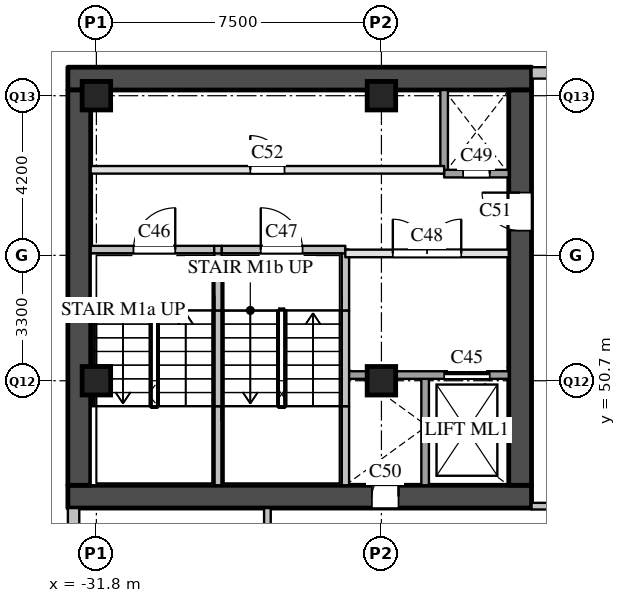
"""IFC4 building model, lengths in metres.
Left out: names, types, materials, properties, quantities, classifications, styles, units other than length and angle.
Written with IfcOpenShell. Run it as: python <this file> out.ifc"""

import sys

from ifc_helpers import new_model, si_unit, direction, frame, frame_2d, origin, origin_2d, place, context, subcontext, project, spatial, rectangle, extrude, element, fill, save


model = new_model("IFC4")
c1 = context("Model", 3, precision=1e-05, world=origin(), true_north=direction((0.0, 1.0)))
c2 = subcontext(c1, "Body", "Model", "MODEL_VIEW")
j1 = project(units=[si_unit("LENGTHUNIT", "METRE"), si_unit("PLANEANGLEUNIT", "RADIAN")], contexts=[c1])
p1 = place(None, origin())
s1 = spatial("IfcSite", under=j1, at=p1, CompositionType="ELEMENT")
p2 = place(p1, origin())
s2 = spatial("IfcBuilding", under=s1, at=p2, CompositionType="ELEMENT")
p3 = place(p2, frame((0.0, 0.0, 21.0)))
s3 = spatial("IfcBuildingStorey", under=s2, at=p3, CompositionType="ELEMENT", Elevation=21.0)
for number, where, z_axis, x_axis in (
    (1, (-31.8, 50.7, 0.0), (0.0, 0.0, 1.0), (1.0, 0.0, 0.0)),
    (2, (-31.8, 58.2, 0.0), (0.0, 0.0, 1.0), (1.0, 0.0, 0.0)),
    (3, (-24.3, 50.7, 0.0), (0.0, 0.0, 1.0), (1.0, 0.0, 0.0)),
    (4, (-24.3, 58.2, 0.0), (0.0, 0.0, 1.0), (1.0, 0.0, 0.0)),
):
    element("IfcColumn", number, at=place(p3, frame(where, z_axis=z_axis, x_axis=x_axis)), inside=s3, PredefinedType="COLUMN", context=c2, shape_type="SweptSolid", body=[
        extrude(rectangle(XDim=0.75, YDim=0.75, at=origin_2d()), origin(), (0.0, 0.0, 1.0), 5.0),
    ])
p4 = place(p3, frame((-16.8, 58.8, 0.0), z_axis=(0.0, 0.0, 1.0), x_axis=(-1.0, 0.0, 0.0)))
e5 = element("IfcWall", 5, at=p4, inside=s3, PredefinedType="SOLIDWALL", context=c2, shape_type="SweptSolid", body=[
    extrude(rectangle(XDim=3.55, YDim=0.3, at=frame_2d((1.775, 0.0))), origin(), (0.0, 0.0, 1.0), 4.59),
])
p5 = place(p3, frame((-32.4, 47.35, 0.0), z_axis=(0.0, 0.0, 1.0), x_axis=(0.0, -1.0, 0.0)))
e6 = element("IfcWall", 6, at=p5, inside=s3, PredefinedType="SOLIDWALL", context=c2, shape_type="SweptSolid", body=[
    extrude(rectangle(XDim=4.15, YDim=0.3, at=frame_2d((2.075, 0.0))), origin(), (0.0, 0.0, 1.0), 4.59),
])
p6 = place(p3, frame((-32.55, 47.65, 0.0), z_axis=(0.0, 0.0, 1.0), x_axis=(1.0, 0.0, 0.0)))
e7 = element("IfcWall", 7, at=p6, inside=s3, PredefinedType="SHEAR", context=c2, shape_type="SweptSolid", body=[
    extrude(rectangle(XDim=12.2, YDim=0.6, at=frame_2d((6.1, 0.0))), origin(), (0.0, 0.0, 1.0), 4.55),
])
p7 = place(p6, frame((8.0, 0.0, 0.0)))
e8 = element("IfcOpeningElement", 8, at=p7, cuts=e7, PredefinedType="OPENING", context=c2, shape_type="SweptSolid", body=[
    extrude(rectangle(XDim=0.7, YDim=2.1, at=frame_2d((0.35, 1.05))), frame((0.0, 0.31, 0.0), z_axis=(0.0, -1.0, 0.0), x_axis=(1.0, 0.0, 0.0)), (0.0, 0.0, 1.0), 0.62),
])
p8 = place(p3, frame((-32.55, 58.65, 0.0), z_axis=(0.0, 0.0, 1.0), x_axis=(1.0, 0.0, 0.0)))
e9 = element("IfcWall", 9, at=p8, inside=s3, PredefinedType="SHEAR", context=c2, shape_type="SweptSolid", body=[
    extrude(rectangle(XDim=12.2, YDim=0.6, at=frame_2d((6.1, 0.0))), origin(), (0.0, 0.0, 1.0), 4.55),
])
p9 = place(p3, frame((-32.25, 47.95, 0.0), z_axis=(0.0, 0.0, 1.0), x_axis=(0.0, 1.0, 0.0)))
e10 = element("IfcWall", 10, at=p9, inside=s3, PredefinedType="SHEAR", context=c2, shape_type="SweptSolid", body=[
    extrude(rectangle(XDim=10.4, YDim=0.6, at=frame_2d((5.2, 0.0))), origin(), (0.0, 0.0, 1.0), 4.55),
])
p10 = place(p3, frame((-20.65, 47.95, 0.0), z_axis=(0.0, 0.0, 1.0), x_axis=(0.0, 1.0, 0.0)))
e11 = element("IfcWall", 11, at=p10, inside=s3, PredefinedType="SHEAR", context=c2, shape_type="SweptSolid", body=[
    extrude(rectangle(XDim=10.4, YDim=0.6, at=frame_2d((5.2, 0.0))), origin(), (0.0, 0.0, 1.0), 4.55),
])
p11 = place(p10, frame((6.7, 0.0, 0.0)))
e12 = element("IfcOpeningElement", 12, at=p11, cuts=e11, PredefinedType="OPENING", context=c2, shape_type="SweptSolid", body=[
    extrude(rectangle(XDim=1.0, YDim=2.1, at=frame_2d((0.5, 1.05))), frame((0.0, 0.31, 0.0), z_axis=(0.0, -1.0, 0.0), x_axis=(1.0, 0.0, 0.0)), (0.0, 0.0, 1.0), 0.62),
])
p12 = place(p3, frame((-28.6, 47.95, 0.0), z_axis=(0.0, 0.0, 1.0), x_axis=(0.0, 1.0, 0.0)))
e13 = element("IfcWall", 13, at=p12, inside=s3, PredefinedType="SOLIDWALL", context=c2, shape_type="SweptSolid", body=[
    extrude(rectangle(XDim=2.08, YDim=0.2, at=frame_2d((1.04, 0.0))), origin(), (0.0, 0.0, 1.0), 4.55),
])
p13 = place(p3, frame((-28.6, 50.03, 0.0), z_axis=(0.0, 0.0, 1.0), x_axis=(0.0, 1.0, 0.0)))
e14 = element("IfcWall", 14, at=p13, inside=s3, PredefinedType="SOLIDWALL", context=c2, shape_type="SweptSolid", body=[
    extrude(rectangle(XDim=2.52, YDim=0.2, at=frame_2d((1.26, 0.0))), origin(), (0.0, 0.0, 1.0), 4.55),
])
p14 = place(p3, frame((-28.6, 52.55, 0.0), z_axis=(0.0, 0.0, 1.0), x_axis=(0.0, 1.0, 0.0)))
e15 = element("IfcWall", 15, at=p14, inside=s3, PredefinedType="SOLIDWALL", context=c2, shape_type="SweptSolid", body=[
    extrude(rectangle(XDim=1.6, YDim=0.2, at=frame_2d((0.8, 0.0))), origin(), (0.0, 0.0, 1.0), 4.55),
])
p15 = place(p3, frame((-25.25, 47.95, 0.0), z_axis=(0.0, 0.0, 1.0), x_axis=(0.0, 1.0, 0.0)))
e16 = element("IfcWall", 16, at=p15, inside=s3, PredefinedType="SOLIDWALL", context=c2, shape_type="SweptSolid", body=[
    extrude(rectangle(XDim=2.08, YDim=0.2, at=frame_2d((1.04, 0.0))), origin(), (0.0, 0.0, 1.0), 4.55),
])
p16 = place(p3, frame((-25.25, 50.03, 0.0), z_axis=(0.0, 0.0, 1.0), x_axis=(0.0, 1.0, 0.0)))
e17 = element("IfcWall", 17, at=p16, inside=s3, PredefinedType="SOLIDWALL", context=c2, shape_type="SweptSolid", body=[
    extrude(rectangle(XDim=2.52, YDim=0.2, at=frame_2d((1.26, 0.0))), origin(), (0.0, 0.0, 1.0), 4.55),
])
p17 = place(p3, frame((-25.25, 52.55, 0.0), z_axis=(0.0, 0.0, 1.0), x_axis=(0.0, 1.0, 0.0)))
e18 = element("IfcWall", 18, at=p17, inside=s3, PredefinedType="SOLIDWALL", context=c2, shape_type="SweptSolid", body=[
    extrude(rectangle(XDim=1.6, YDim=0.2, at=frame_2d((0.8, 0.0))), origin(), (0.0, 0.0, 1.0), 4.55),
])
p18 = place(p3, frame((-23.15, 47.95, 0.0), z_axis=(0.0, 0.0, 1.0), x_axis=(0.0, 1.0, 0.0)))
e19 = element("IfcWall", 19, at=p18, inside=s3, PredefinedType="SOLIDWALL", context=c2, shape_type="SweptSolid", body=[
    extrude(rectangle(XDim=2.9, YDim=0.2, at=frame_2d((1.45, 0.0))), origin(), (0.0, 0.0, 1.0), 4.55),
])
p19 = place(p3, frame((-22.65, 56.15, 0.0), z_axis=(0.0, 0.0, 1.0), x_axis=(0.0, 1.0, 0.0)))
e20 = element("IfcWall", 20, at=p19, inside=s3, PredefinedType="SOLIDWALL", context=c2, shape_type="SweptSolid", body=[
    extrude(rectangle(XDim=2.2, YDim=0.2, at=frame_2d((1.1, 0.0))), origin(), (0.0, 0.0, 1.0), 4.55),
])
p20 = place(p3, frame((-25.25, 50.85, 0.0), z_axis=(0.0, 0.0, 1.0), x_axis=(1.0, 0.0, 0.0)))
e21 = element("IfcWall", 21, at=p20, inside=s3, PredefinedType="SOLIDWALL", context=c2, shape_type="SweptSolid", body=[
    extrude(rectangle(XDim=4.3, YDim=0.2, at=frame_2d((2.15, 0.0))), origin(), (0.0, 0.0, 1.0), 4.55),
])
p21 = place(p20, frame((2.6, 0.0, 0.0)))
e22 = element("IfcOpeningElement", 22, at=p21, cuts=e21, PredefinedType="OPENING", context=c2, shape_type="SweptSolid", body=[
    extrude(rectangle(XDim=1.2, YDim=2.1, at=frame_2d((0.6, 1.05))), frame((0.0, 0.11, 0.0), z_axis=(0.0, -1.0, 0.0), x_axis=(1.0, 0.0, 0.0)), (0.0, 0.0, 1.0), 0.22),
])
p22 = place(p3, frame((-25.25, 54.05, 0.0), z_axis=(0.0, 0.0, 1.0), x_axis=(1.0, 0.0, 0.0)))
e23 = element("IfcWall", 23, at=p22, inside=s3, PredefinedType="PARTITIONING", context=c2, shape_type="SweptSolid", body=[
    extrude(rectangle(XDim=4.3, YDim=0.2, at=frame_2d((2.15, 0.0))), origin(), (0.0, 0.0, 1.0), 4.55),
])
p23 = place(p22, frame((1.25, 0.0, 0.0)))
e24 = element("IfcOpeningElement", 24, at=p23, cuts=e23, PredefinedType="OPENING", context=c2, shape_type="SweptSolid", body=[
    extrude(rectangle(XDim=1.8, YDim=2.1, at=frame_2d((0.9, 1.05))), frame((0.0, 0.11, 0.0), z_axis=(0.0, -1.0, 0.0), x_axis=(1.0, 0.0, 0.0)), (0.0, 0.0, 1.0), 0.22),
])
p24 = place(p3, frame((-31.95, 54.15, 0.0), z_axis=(0.0, 0.0, 1.0), x_axis=(1.0, 0.0, 0.0)))
e25 = element("IfcWall", 25, at=p24, inside=s3, PredefinedType="SOLIDWALL", context=c2, shape_type="SweptSolid", body=[
    extrude(rectangle(XDim=3.25, YDim=0.2, at=frame_2d((1.625, 0.0))), origin(), (0.0, 0.0, 1.0), 4.55),
])
p25 = place(p24, frame((1.125, 0.0, 0.0)))
e26 = element("IfcOpeningElement", 26, at=p25, cuts=e25, PredefinedType="OPENING", context=c2, shape_type="SweptSolid", body=[
    extrude(rectangle(XDim=1.1, YDim=2.1, at=frame_2d((0.55, 1.05))), frame((0.0, 0.11, 0.0), z_axis=(0.0, -1.0, 0.0), x_axis=(1.0, 0.0, 0.0)), (0.0, 0.0, 1.0), 0.22),
])
p26 = place(p3, frame((-28.7, 54.15, 0.0), z_axis=(0.0, 0.0, 1.0), x_axis=(1.0, 0.0, 0.0)))
e27 = element("IfcWall", 27, at=p26, inside=s3, PredefinedType="SOLIDWALL", context=c2, shape_type="SweptSolid", body=[
    extrude(rectangle(XDim=0.2, YDim=0.2, at=frame_2d((0.1, 0.0))), origin(), (0.0, 0.0, 1.0), 4.55),
])
p27 = place(p3, frame((-28.5, 54.15, 0.0), z_axis=(0.0, 0.0, 1.0), x_axis=(1.0, 0.0, 0.0)))
e28 = element("IfcWall", 28, at=p27, inside=s3, PredefinedType="SOLIDWALL", context=c2, shape_type="SweptSolid", body=[
    extrude(rectangle(XDim=3.25, YDim=0.2, at=frame_2d((1.625, 0.0))), origin(), (0.0, 0.0, 1.0), 4.55),
])
p28 = place(p27, frame((1.025, 0.0, 0.0)))
e29 = element("IfcOpeningElement", 29, at=p28, cuts=e28, PredefinedType="OPENING", context=c2, shape_type="SweptSolid", body=[
    extrude(rectangle(XDim=1.1, YDim=2.1, at=frame_2d((0.55, 1.05))), frame((0.0, 0.11, 0.0), z_axis=(0.0, -1.0, 0.0), x_axis=(1.0, 0.0, 0.0)), (0.0, 0.0, 1.0), 0.22),
])
p29 = place(p3, frame((-31.95, 56.25, 0.0), z_axis=(0.0, 0.0, 1.0), x_axis=(1.0, 0.0, 0.0)))
e30 = element("IfcWall", 30, at=p29, inside=s3, PredefinedType="PARTITIONING", context=c2, shape_type="SweptSolid", body=[
    extrude(rectangle(XDim=9.3, YDim=0.2, at=frame_2d((4.65, 0.0))), origin(), (0.0, 0.0, 1.0), 4.55),
])
p30 = place(p29, frame((4.2, 0.0, 0.0)))
e31 = element("IfcOpeningElement", 31, at=p30, cuts=e30, PredefinedType="OPENING", context=c2, shape_type="SweptSolid", body=[
    extrude(rectangle(XDim=0.9, YDim=2.1, at=frame_2d((0.45, 1.05))), frame((0.0, 0.11, 0.0), z_axis=(0.0, -1.0, 0.0), x_axis=(1.0, 0.0, 0.0)), (0.0, 0.0, 1.0), 0.22),
])
p31 = place(p3, frame((-22.65, 56.15, 0.0), z_axis=(0.0, 0.0, 1.0), x_axis=(1.0, 0.0, 0.0)))
e32 = element("IfcWall", 32, at=p31, inside=s3, PredefinedType="SOLIDWALL", context=c2, shape_type="SweptSolid", body=[
    extrude(rectangle(XDim=1.7, YDim=0.2, at=frame_2d((0.85, 0.0))), origin(), (0.0, 0.0, 1.0), 4.55),
])
p32 = place(p31, frame((0.5, 0.0, 0.0)))
e33 = element("IfcOpeningElement", 33, at=p32, cuts=e32, PredefinedType="OPENING", context=c2, shape_type="SweptSolid", body=[
    extrude(rectangle(XDim=0.7, YDim=2.1, at=frame_2d((0.35, 1.05))), frame((0.0, 0.11, 0.0), z_axis=(0.0, -1.0, 0.0), x_axis=(1.0, 0.0, 0.0)), (0.0, 0.0, 1.0), 0.22),
])
p33 = place(p3, frame((-20.35, 47.4, 0.0), z_axis=(0.0, 0.0, 1.0), x_axis=(1.0, 0.0, 0.0)))
e34 = element("IfcWall", 34, at=p33, inside=s3, PredefinedType="PARTITIONING", context=c2, shape_type="SweptSolid", body=[
    extrude(rectangle(XDim=16.3, YDim=0.175, at=frame_2d((8.15, 0.0))), origin(), (0.0, 0.0, 1.0), 3.79),
])
p34 = place(p33, frame((1.775, 0.0, 0.0)))
e35 = element("IfcOpeningElement", 35, at=p34, cuts=e34, PredefinedType="OPENING", context=c2, shape_type="SweptSolid", body=[
    extrude(rectangle(XDim=1.0, YDim=2.1, at=frame_2d((0.5, 1.05))), frame((0.0, 0.097, 0.0), z_axis=(0.0, -1.0, 0.0), x_axis=(1.0, 0.0, 0.0)), (0.0, 0.0, 1.0), 0.195),
])
p35 = place(p3, frame((-27.3, 30.0, 0.0), z_axis=(0.0, 0.0, 1.0), x_axis=(0.0, 1.0, 0.0)))
e36 = element("IfcWall", 36, at=p35, inside=s3, PredefinedType="PARTITIONING", context=c2, shape_type="SweptSolid", body=[
    extrude(rectangle(XDim=17.35, YDim=0.175, at=frame_2d((8.675, 0.0))), origin(), (0.0, 0.0, 1.0), 3.79),
])
p36 = place(p35, frame((10.975, 0.0, 0.0)))
e37 = element("IfcOpeningElement", 37, at=p36, cuts=e36, PredefinedType="OPENING", context=c2, shape_type="SweptSolid", body=[
    extrude(rectangle(XDim=1.0, YDim=2.1, at=frame_2d((0.5, 1.05))), frame((0.0, 0.097, 0.0), z_axis=(0.0, -1.0, 0.0), x_axis=(1.0, 0.0, 0.0)), (0.0, 0.0, 1.0), 0.195),
])
p37 = place(p21, origin())
e38 = element("IfcDoor", 38, at=p37, inside=s3, OperationType="SLIDING_TO_LEFT", PredefinedType="DOOR", context=c2, shape_type="SweptSolid", body=[
    extrude(rectangle(XDim=1.2, YDim=2.1, at=frame_2d((0.6, 1.05))), frame((0.0, 0.025, 0.0), z_axis=(0.0, -1.0, 0.0), x_axis=(1.0, 0.0, 0.0)), (0.0, 0.0, 1.0), 0.05),
])
fill(e22, e38)
p38 = place(p25, origin())
e39 = element("IfcDoor", 39, at=p38, inside=s3, OperationType="SINGLE_SWING_RIGHT", PredefinedType="DOOR", context=c2, shape_type="SweptSolid", body=[
    extrude(rectangle(XDim=1.1, YDim=2.1, at=frame_2d((0.55, 1.05))), frame((0.0, 0.025, 0.0), z_axis=(0.0, -1.0, 0.0), x_axis=(1.0, 0.0, 0.0)), (0.0, 0.0, 1.0), 0.05),
])
fill(e26, e39)
p39 = place(p28, origin())
e40 = element("IfcDoor", 40, at=p39, inside=s3, OperationType="SINGLE_SWING_LEFT", PredefinedType="DOOR", context=c2, shape_type="SweptSolid", body=[
    extrude(rectangle(XDim=1.1, YDim=2.1, at=frame_2d((0.55, 1.05))), frame((0.0, 0.025, 0.0), z_axis=(0.0, -1.0, 0.0), x_axis=(1.0, 0.0, 0.0)), (0.0, 0.0, 1.0), 0.05),
])
fill(e29, e40)
p40 = place(p23, origin())
e41 = element("IfcDoor", 41, at=p40, inside=s3, OperationType="DOUBLE_DOOR_SINGLE_SWING", PredefinedType="DOOR", context=c2, shape_type="SweptSolid", body=[
    extrude(rectangle(XDim=1.8, YDim=2.1, at=frame_2d((0.9, 1.05))), frame((0.0, 0.025, 0.0), z_axis=(0.0, -1.0, 0.0), x_axis=(1.0, 0.0, 0.0)), (0.0, 0.0, 1.0), 0.05),
])
fill(e24, e41)
p41 = place(p32, origin())
e42 = element("IfcDoor", 42, at=p41, inside=s3, OperationType="SINGLE_SWING_RIGHT", PredefinedType="DOOR", context=c2, shape_type="SweptSolid", body=[
    extrude(rectangle(XDim=0.7, YDim=2.1, at=frame_2d((0.35, 1.05))), frame((0.0, 0.025, 0.0), z_axis=(0.0, -1.0, 0.0), x_axis=(1.0, 0.0, 0.0)), (0.0, 0.0, 1.0), 0.05),
])
fill(e33, e42)
p42 = place(p7, origin())
e43 = element("IfcDoor", 43, at=p42, inside=s3, OperationType="SINGLE_SWING_RIGHT", PredefinedType="DOOR", context=c2, shape_type="SweptSolid", body=[
    extrude(rectangle(XDim=0.7, YDim=2.1, at=frame_2d((0.35, 1.05))), frame((0.0, 0.025, 0.0), z_axis=(0.0, -1.0, 0.0), x_axis=(1.0, 0.0, 0.0)), (0.0, 0.0, 1.0), 0.05),
])
fill(e8, e43)
p43 = place(p11, origin())
e44 = element("IfcDoor", 44, at=p43, inside=s3, OperationType="SINGLE_SWING_RIGHT", PredefinedType="DOOR", context=c2, shape_type="SweptSolid", body=[
    extrude(rectangle(XDim=1.0, YDim=2.1, at=frame_2d((0.5, 1.05))), frame((0.0, 0.025, 0.0), z_axis=(0.0, -1.0, 0.0), x_axis=(1.0, 0.0, 0.0)), (0.0, 0.0, 1.0), 0.05),
])
fill(e12, e44)
p44 = place(p30, origin())
e45 = element("IfcDoor", 45, at=p44, inside=s3, OperationType="SINGLE_SWING_LEFT", PredefinedType="DOOR", context=c2, shape_type="SweptSolid", body=[
    extrude(rectangle(XDim=0.9, YDim=2.1, at=frame_2d((0.45, 1.05))), frame((0.0, 0.025, 0.0), z_axis=(0.0, -1.0, 0.0), x_axis=(1.0, 0.0, 0.0)), (0.0, 0.0, 1.0), 0.05),
])
fill(e31, e45)
save(model, sys.argv[1])
